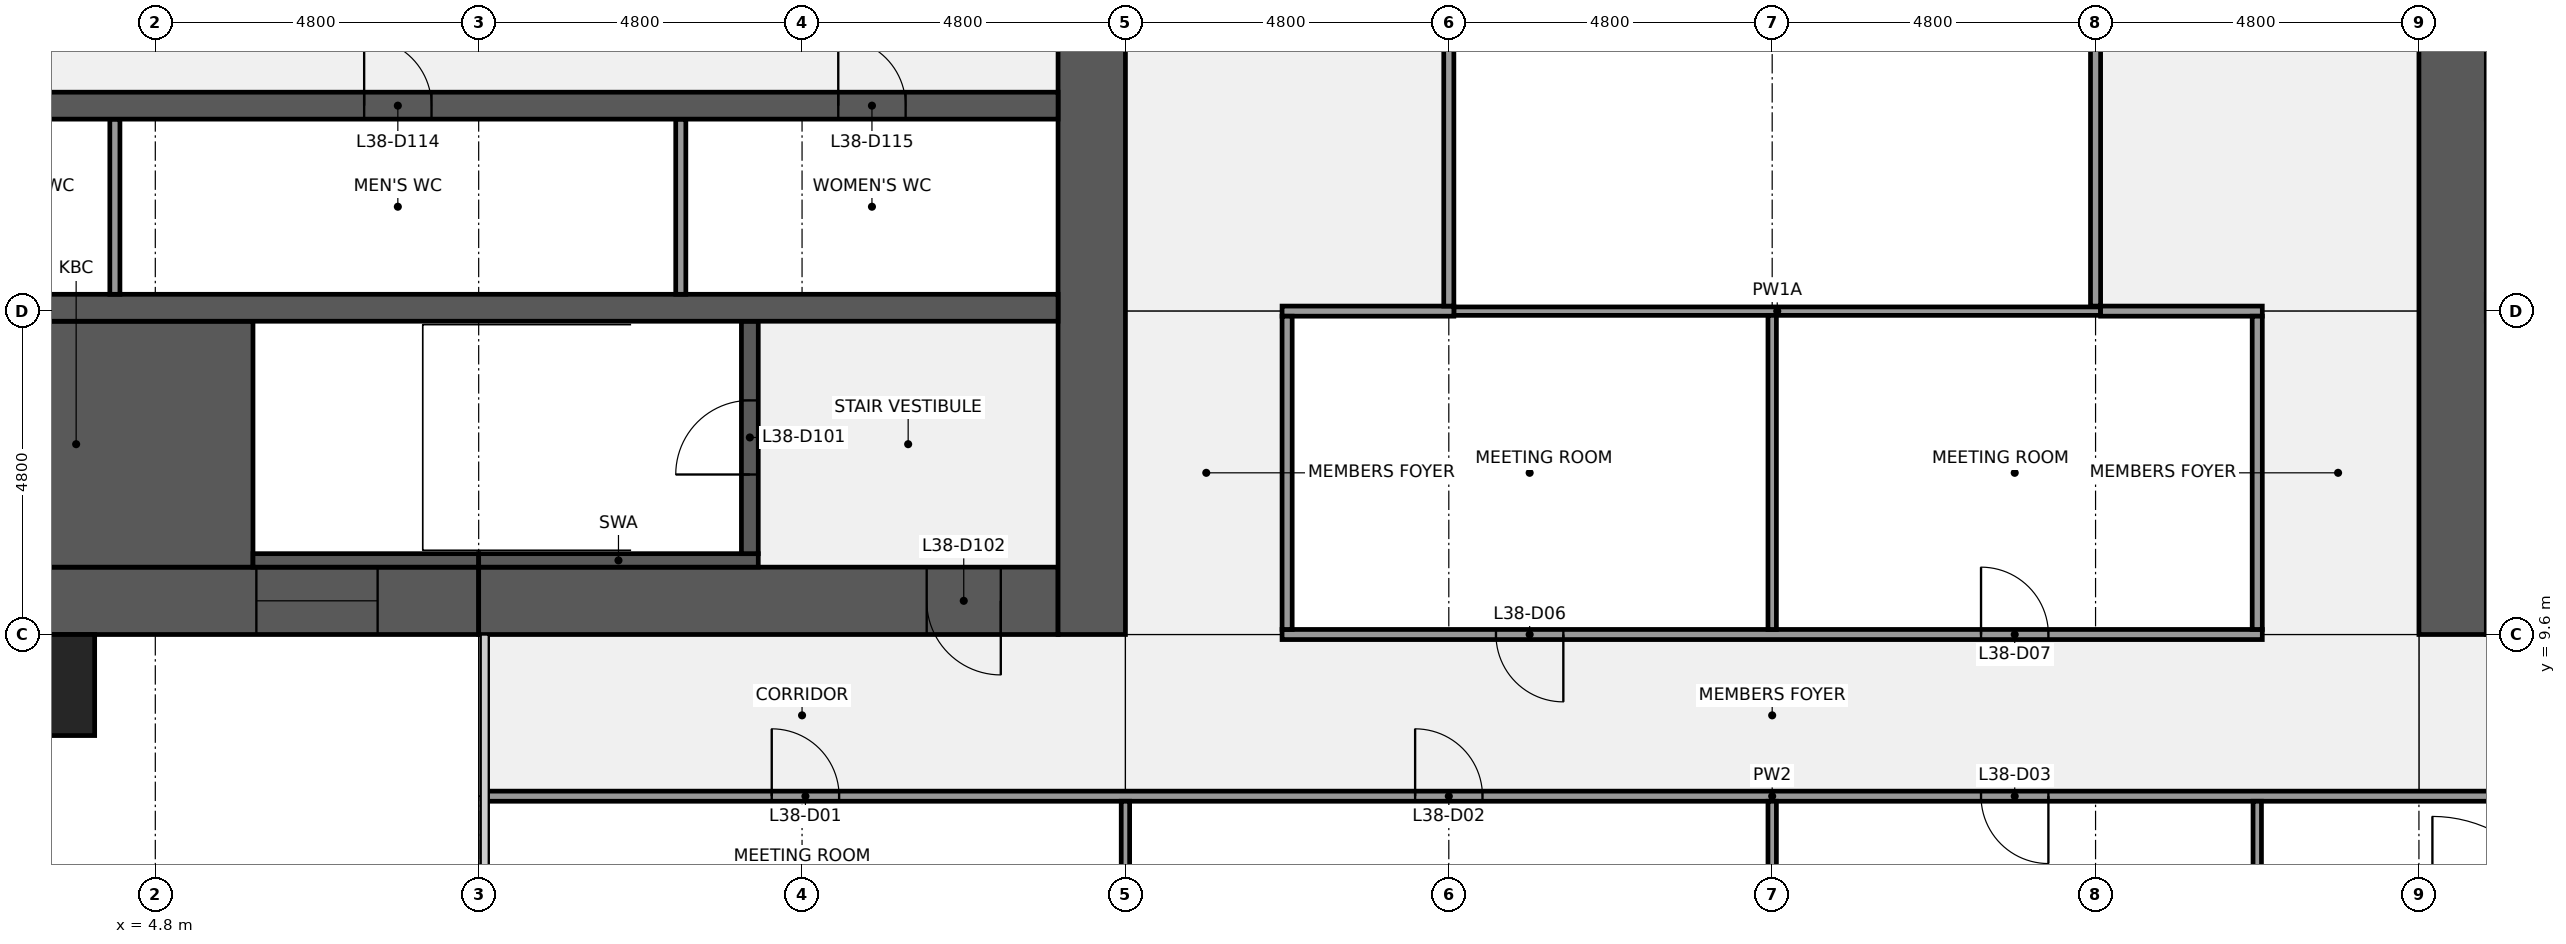
"""IFC4 building model, lengths in metres.
Left out: names, types, materials, properties, quantities, classifications, styles, units other than length and angle.
Written with IfcOpenShell. Run it as: python <this file> out.ifc"""

import sys

from ifc_helpers import new_model, si_unit, direction, frame, frame_2d, origin, origin_2d, place, context, subcontext, project, spatial, rectangle, extrude, element, fill, save


model = new_model("IFC4")
c1 = context("Model", 3, precision=1e-05, world=origin(), true_north=direction((0.0, 1.0)))
c2 = subcontext(c1, "Body", "Model", "MODEL_VIEW")
j1 = project(units=[si_unit("LENGTHUNIT", "METRE"), si_unit("PLANEANGLEUNIT", "RADIAN")], contexts=[c1])
p1 = place(None, origin())
s1 = spatial("IfcSite", under=j1, at=p1, CompositionType="ELEMENT")
p2 = place(p1, origin())
s2 = spatial("IfcBuilding", under=s1, at=p2, CompositionType="ELEMENT")
p3 = place(p2, frame((0.0, 0.0, 172.1)))
s3 = spatial("IfcBuildingStorey", under=s2, at=p3, CompositionType="ELEMENT", Elevation=172.1)
p4 = place(p3, frame((9.6, 10.1, 0.0), z_axis=(0.0, 0.0, 1.0), x_axis=(-1.0, 0.0, 0.0)))
e1 = element("IfcWall", 1, at=p4, inside=s3, PredefinedType="SHEAR", context=c2, shape_type="SweptSolid", body=[
    extrude(rectangle(XDim=8.6, YDim=1.0, at=frame_2d((4.3, 0.0))), origin(), (0.0, 0.0, 1.0), 3.7),
])
p5 = place(p4, frame((1.5, 0.0, 0.9)))
e2 = element("IfcOpeningElement", 2, at=p5, cuts=e1, PredefinedType="OPENING", context=c2, shape_type="SweptSolid", body=[
    extrude(rectangle(XDim=1.8, YDim=1.5, at=frame_2d((0.9, 0.75))), frame((0.0, 0.51, 0.0), z_axis=(0.0, -1.0, 0.0), x_axis=(1.0, 0.0, 0.0)), (0.0, 0.0, 1.0), 1.02),
])
p6 = place(p3, frame((18.2, 10.1, 0.0), z_axis=(0.0, 0.0, 1.0), x_axis=(-1.0, 0.0, 0.0)))
e3 = element("IfcWall", 3, at=p6, inside=s3, PredefinedType="SHEAR", context=c2, shape_type="SweptSolid", body=[
    extrude(rectangle(XDim=8.6, YDim=1.0, at=frame_2d((4.3, 0.0))), origin(), (0.0, 0.0, 1.0), 3.7),
])
p7 = place(p6, frame((0.85, 0.0, 0.0)))
e4 = element("IfcOpeningElement", 4, at=p7, cuts=e3, PredefinedType="OPENING", context=c2, shape_type="SweptSolid", body=[
    extrude(rectangle(XDim=1.1, YDim=2.1, at=frame_2d((0.55, 1.05))), frame((0.0, 0.51, 0.0), z_axis=(0.0, -1.0, 0.0), x_axis=(1.0, 0.0, 0.0)), (0.0, 0.0, 1.0), 1.02),
])
p8 = place(p3, frame((18.7, 38.4, 0.0), z_axis=(0.0, 0.0, 1.0), x_axis=(0.0, -1.0, 0.0)))
e5 = element("IfcWall", 5, at=p8, inside=s3, PredefinedType="SHEAR", context=c2, shape_type="SweptSolid", body=[
    extrude(rectangle(XDim=28.8, YDim=1.0, at=frame_2d((14.4, 0.0))), origin(), (0.0, 0.0, 1.0), 3.7),
])
p9 = place(p8, frame((18.3, 0.0, 0.0)))
e6 = element("IfcOpeningElement", 6, at=p9, cuts=e5, PredefinedType="OPENING", context=c2, shape_type="SweptSolid", body=[
    extrude(rectangle(XDim=1.8, YDim=2.1, at=frame_2d((0.9, 1.05))), frame((0.0, 0.51, 0.0), z_axis=(0.0, -1.0, 0.0), x_axis=(1.0, 0.0, 0.0)), (0.0, 0.0, 1.0), 1.02),
])
p10 = place(p8, frame((8.7, 0.0, 0.0)))
e7 = element("IfcOpeningElement", 7, at=p10, cuts=e5, PredefinedType="OPENING", context=c2, shape_type="SweptSolid", body=[
    extrude(rectangle(XDim=1.8, YDim=2.1, at=frame_2d((0.9, 1.05))), frame((0.0, 0.51, 0.0), z_axis=(0.0, -1.0, 0.0), x_axis=(1.0, 0.0, 0.0)), (0.0, 0.0, 1.0), 1.02),
])
p11 = place(p3, frame((1.0, 12.425, 0.0), z_axis=(0.0, 0.0, 1.0), x_axis=(1.0, 0.0, 0.0)))
e8 = element("IfcWall", 8, at=p11, inside=s3, PredefinedType="SHEAR", context=c2, shape_type="SweptSolid", body=[
    extrude(rectangle(XDim=5.25, YDim=3.65, at=frame_2d((2.625, 0.0))), origin(), (0.0, 0.0, 1.0), 3.7),
])
p12 = place(p3, frame((6.25, 10.7, 0.0), z_axis=(0.0, 0.0, 1.0), x_axis=(1.0, 0.0, 0.0)))
e9 = element("IfcWall", 9, at=p12, inside=s3, PredefinedType="SHEAR", context=c2, shape_type="SweptSolid", body=[
    extrude(rectangle(XDim=3.35, YDim=0.2, at=frame_2d((1.675, 0.0))), origin(), (0.0, 0.0, 1.0), 3.7),
])
p13 = place(p3, frame((9.6, 10.7, 0.0), z_axis=(0.0, 0.0, 1.0), x_axis=(1.0, 0.0, 0.0)))
e10 = element("IfcWall", 10, at=p13, inside=s3, PredefinedType="SHEAR", context=c2, shape_type="SweptSolid", body=[
    extrude(rectangle(XDim=4.15, YDim=0.2, at=frame_2d((2.075, 0.0))), origin(), (0.0, 0.0, 1.0), 3.7),
])
p14 = place(p3, frame((13.625, 10.8, 0.0), z_axis=(0.0, 0.0, 1.0), x_axis=(0.0, 1.0, 0.0)))
e11 = element("IfcWall", 11, at=p14, inside=s3, PredefinedType="SHEAR", context=c2, shape_type="SweptSolid", body=[
    extrude(rectangle(XDim=3.45, YDim=0.25, at=frame_2d((1.725, 0.0))), origin(), (0.0, 0.0, 1.0), 3.7),
])
p15 = place(p14, frame((1.175, 0.0, 0.0)))
e12 = element("IfcOpeningElement", 12, at=p15, cuts=e11, PredefinedType="OPENING", context=c2, shape_type="SweptSolid", body=[
    extrude(rectangle(XDim=1.1, YDim=2.1, at=frame_2d((0.55, 1.05))), frame((0.0, 0.135, 0.0), z_axis=(0.0, -1.0, 0.0), x_axis=(1.0, 0.0, 0.0)), (0.0, 0.0, 1.0), 0.27),
])
p16 = place(p3, frame((1.0, 14.45, 0.0), z_axis=(0.0, 0.0, 1.0), x_axis=(1.0, 0.0, 0.0)))
e13 = element("IfcWall", 13, at=p16, inside=s3, PredefinedType="SHEAR", context=c2, shape_type="SweptSolid", body=[
    extrude(rectangle(XDim=17.2, YDim=0.4, at=frame_2d((8.6, 0.0))), origin(), (0.0, 0.0, 1.0), 3.7),
])
for number, where, z_axis, x_axis in (
    (14, (4.2, 14.65, 0.0), (0.0, 0.0, 1.0), (0.0, 1.0, 0.0)),
    (15, (12.6, 14.65, 0.0), (0.0, 0.0, 1.0), (0.0, 1.0, 0.0)),
):
    element("IfcWall", number, at=place(p3, frame(where, z_axis=z_axis, x_axis=x_axis)), inside=s3, PredefinedType="PARTITIONING", context=c2, shape_type="SweptSolid", body=[
        extrude(rectangle(XDim=2.6, YDim=0.15, at=frame_2d((1.3, 0.0))), origin(), (0.0, 0.0, 1.0), 3.7),
    ])
p17 = place(p3, frame((1.0, 17.45, 0.0), z_axis=(0.0, 0.0, 1.0), x_axis=(1.0, 0.0, 0.0)))
e16 = element("IfcWall", 16, at=p17, inside=s3, PredefinedType="SHEAR", context=c2, shape_type="SweptSolid", body=[
    extrude(rectangle(XDim=17.2, YDim=0.4, at=frame_2d((8.6, 0.0))), origin(), (0.0, 0.0, 1.0), 3.7),
])
p18 = place(p17, frame((1.062, 0.0, 0.0)))
e17 = element("IfcOpeningElement", 17, at=p18, cuts=e16, PredefinedType="OPENING", context=c2, shape_type="SweptSolid", body=[
    extrude(rectangle(XDim=1.0, YDim=2.1, at=frame_2d((0.5, 1.05))), frame((0.0, 0.21, 0.0), z_axis=(0.0, -1.0, 0.0), x_axis=(1.0, 0.0, 0.0)), (0.0, 0.0, 1.0), 0.42),
])
p19 = place(p17, frame((6.9, 0.0, 0.0)))
e18 = element("IfcOpeningElement", 18, at=p19, cuts=e16, PredefinedType="OPENING", context=c2, shape_type="SweptSolid", body=[
    extrude(rectangle(XDim=1.0, YDim=2.1, at=frame_2d((0.5, 1.05))), frame((0.0, 0.21, 0.0), z_axis=(0.0, -1.0, 0.0), x_axis=(1.0, 0.0, 0.0)), (0.0, 0.0, 1.0), 0.42),
])
p20 = place(p17, frame((13.938, 0.0, 0.0)))
e19 = element("IfcOpeningElement", 19, at=p20, cuts=e16, PredefinedType="OPENING", context=c2, shape_type="SweptSolid", body=[
    extrude(rectangle(XDim=1.0, YDim=2.1, at=frame_2d((0.5, 1.05))), frame((0.0, 0.21, 0.0), z_axis=(0.0, -1.0, 0.0), x_axis=(1.0, 0.0, 0.0)), (0.0, 0.0, 1.0), 0.42),
])
p21 = place(p3, frame((38.9, 9.6, 0.0), z_axis=(0.0, 0.0, 1.0), x_axis=(0.0, 1.0, 0.0)))
e20 = element("IfcWall", 20, at=p21, inside=s3, PredefinedType="SHEAR", context=c2, shape_type="SweptSolid", body=[
    extrude(rectangle(XDim=28.8, YDim=1.0, at=frame_2d((14.4, 0.0))), origin(), (0.0, 0.0, 1.0), 3.7),
])
p22 = place(p21, frame((8.7, 0.0, 0.0)))
e21 = element("IfcOpeningElement", 21, at=p22, cuts=e20, PredefinedType="OPENING", context=c2, shape_type="SweptSolid", body=[
    extrude(rectangle(XDim=1.8, YDim=2.1, at=frame_2d((0.9, 1.05))), frame((0.0, 0.51, 0.0), z_axis=(0.0, -1.0, 0.0), x_axis=(1.0, 0.0, 0.0)), (0.0, 0.0, 1.0), 1.02),
])
p23 = place(p21, frame((18.3, 0.0, 0.0)))
e22 = element("IfcOpeningElement", 22, at=p23, cuts=e20, PredefinedType="OPENING", context=c2, shape_type="SweptSolid", body=[
    extrude(rectangle(XDim=1.8, YDim=2.1, at=frame_2d((0.9, 1.05))), frame((0.0, 0.51, 0.0), z_axis=(0.0, -1.0, 0.0), x_axis=(1.0, 0.0, 0.0)), (0.0, 0.0, 1.0), 1.02),
])
p24 = place(p3, frame((9.7, 7.2, 0.0), z_axis=(0.0, 0.0, 1.0), x_axis=(1.0, 0.0, 0.0)))
e23 = element("IfcWall", 23, at=p24, inside=s3, PredefinedType="PARTITIONING", context=c2, shape_type="SweptSolid", body=[
    extrude(rectangle(XDim=38.2, YDim=0.15, at=frame_2d((19.1, 0.0))), origin(), (0.0, 0.0, 1.0), 2.709),
])
p25 = place(p24, frame((4.25, 0.0, 0.0)))
e24 = element("IfcOpeningElement", 24, at=p25, cuts=e23, PredefinedType="OPENING", context=c2, shape_type="SweptSolid", body=[
    extrude(rectangle(XDim=1.0, YDim=2.1, at=frame_2d((0.5, 1.05))), frame((0.0, 0.085, 0.0), z_axis=(0.0, -1.0, 0.0), x_axis=(1.0, 0.0, 0.0)), (0.0, 0.0, 1.0), 0.17),
])
p26 = place(p24, frame((13.8, 0.0, 0.0)))
e25 = element("IfcOpeningElement", 25, at=p26, cuts=e23, PredefinedType="OPENING", context=c2, shape_type="SweptSolid", body=[
    extrude(rectangle(XDim=1.0, YDim=2.1, at=frame_2d((0.5, 1.05))), frame((0.0, 0.085, 0.0), z_axis=(0.0, -1.0, 0.0), x_axis=(1.0, 0.0, 0.0)), (0.0, 0.0, 1.0), 0.17),
])
p27 = place(p24, frame((22.2, 0.0, 0.0)))
e26 = element("IfcOpeningElement", 26, at=p27, cuts=e23, PredefinedType="OPENING", context=c2, shape_type="SweptSolid", body=[
    extrude(rectangle(XDim=1.0, YDim=2.1, at=frame_2d((0.5, 1.05))), frame((0.0, 0.085, 0.0), z_axis=(0.0, -1.0, 0.0), x_axis=(1.0, 0.0, 0.0)), (0.0, 0.0, 1.0), 0.17),
])
p28 = place(p24, frame((30.6, 0.0, 0.0)))
e27 = element("IfcOpeningElement", 27, at=p28, cuts=e23, PredefinedType="OPENING", context=c2, shape_type="SweptSolid", body=[
    extrude(rectangle(XDim=1.0, YDim=2.1, at=frame_2d((0.5, 1.05))), frame((0.0, 0.085, 0.0), z_axis=(0.0, -1.0, 0.0), x_axis=(1.0, 0.0, 0.0)), (0.0, 0.0, 1.0), 0.17),
])
p29 = place(p24, frame((35.35, 0.0, 0.0)))
e28 = element("IfcOpeningElement", 28, at=p29, cuts=e23, PredefinedType="OPENING", context=c2, shape_type="SweptSolid", body=[
    extrude(rectangle(XDim=1.0, YDim=2.1, at=frame_2d((0.5, 1.05))), frame((0.0, 0.085, 0.0), z_axis=(0.0, -1.0, 0.0), x_axis=(1.0, 0.0, 0.0)), (0.0, 0.0, 1.0), 0.17),
])
p30 = place(p3, frame((21.525, 9.6, 0.0), z_axis=(0.0, 0.0, 1.0), x_axis=(1.0, 0.0, 0.0)))
e29 = element("IfcWall", 29, at=p30, inside=s3, PredefinedType="PARTITIONING", context=c2, shape_type="SweptSolid", body=[
    extrude(rectangle(XDim=14.55, YDim=0.15, at=frame_2d((7.275, 0.0))), origin(), (0.0, 0.0, 1.0), 2.709),
])
p31 = place(p30, frame((3.175, 0.0, 0.0)))
e30 = element("IfcOpeningElement", 30, at=p31, cuts=e29, PredefinedType="OPENING", context=c2, shape_type="SweptSolid", body=[
    extrude(rectangle(XDim=1.0, YDim=2.1, at=frame_2d((0.5, 1.05))), frame((0.0, 0.085, 0.0), z_axis=(0.0, -1.0, 0.0), x_axis=(1.0, 0.0, 0.0)), (0.0, 0.0, 1.0), 0.17),
])
p32 = place(p30, frame((10.375, 0.0, 0.0)))
e31 = element("IfcOpeningElement", 31, at=p32, cuts=e29, PredefinedType="OPENING", context=c2, shape_type="SweptSolid", body=[
    extrude(rectangle(XDim=1.0, YDim=2.1, at=frame_2d((0.5, 1.05))), frame((0.0, 0.085, 0.0), z_axis=(0.0, -1.0, 0.0), x_axis=(1.0, 0.0, 0.0)), (0.0, 0.0, 1.0), 0.17),
])
p33 = place(p3, frame((24.075, 14.4, 0.0), z_axis=(0.0, 0.0, 1.0), x_axis=(1.0, 0.0, 0.0)))
e32 = element("IfcWall", 32, at=p33, inside=s3, PredefinedType="PARTITIONING", context=c2, shape_type="SweptSolid", body=[
    extrude(rectangle(XDim=9.6, YDim=0.125, at=frame_2d((4.8, 0.0))), origin(), (0.0, 0.0, 1.0), 2.709),
])
p34 = place(p3, frame((21.525, 14.4, 0.0), z_axis=(0.0, 0.0, 1.0), x_axis=(1.0, 0.0, 0.0)))
e33 = element("IfcWall", 33, at=p34, inside=s3, PredefinedType="PARTITIONING", context=c2, shape_type="SweptSolid", body=[
    extrude(rectangle(XDim=2.55, YDim=0.15, at=frame_2d((1.275, 0.0))), origin(), (0.0, 0.0, 1.0), 2.709),
])
p35 = place(p3, frame((33.675, 14.4, 0.0), z_axis=(0.0, 0.0, 1.0), x_axis=(1.0, 0.0, 0.0)))
e34 = element("IfcWall", 34, at=p35, inside=s3, PredefinedType="PARTITIONING", context=c2, shape_type="SweptSolid", body=[
    extrude(rectangle(XDim=2.4, YDim=0.15, at=frame_2d((1.2, 0.0))), origin(), (0.0, 0.0, 1.0), 2.709),
])
p36 = place(p3, frame((19.2, 4.9, 0.0), z_axis=(0.0, 0.0, 1.0), x_axis=(0.0, 1.0, 0.0)))
e35 = element("IfcWall", 35, at=p36, inside=s3, PredefinedType="PARTITIONING", context=c2, shape_type="SweptSolid", body=[
    extrude(rectangle(XDim=2.225, YDim=0.125, at=frame_2d((1.113, 0.0))), origin(), (0.0, 0.0, 1.0), 2.709),
])
p37 = place(p3, frame((21.6, 9.675, 0.0), z_axis=(0.0, 0.0, 1.0), x_axis=(0.0, 1.0, 0.0)))
e36 = element("IfcWall", 36, at=p37, inside=s3, PredefinedType="PARTITIONING", context=c2, shape_type="SweptSolid", body=[
    extrude(rectangle(XDim=4.65, YDim=0.15, at=frame_2d((2.325, 0.0))), origin(), (0.0, 0.0, 1.0), 2.709),
])
p38 = place(p3, frame((24.0, 14.475, 0.0), z_axis=(0.0, 0.0, 1.0), x_axis=(0.0, 1.0, 0.0)))
e37 = element("IfcWall", 37, at=p38, inside=s3, PredefinedType="PARTITIONING", context=c2, shape_type="SweptSolid", body=[
    extrude(rectangle(XDim=13.05, YDim=0.15, at=frame_2d((6.525, 0.0))), origin(), (0.0, 0.0, 1.0), 2.709),
])
p39 = place(p38, frame((6.025, 0.0, 0.0)))
e38 = element("IfcOpeningElement", 38, at=p39, cuts=e37, PredefinedType="OPENING", context=c2, shape_type="SweptSolid", body=[
    extrude(rectangle(XDim=1.0, YDim=2.1, at=frame_2d((0.5, 1.05))), frame((0.0, 0.085, 0.0), z_axis=(0.0, -1.0, 0.0), x_axis=(1.0, 0.0, 0.0)), (0.0, 0.0, 1.0), 0.17),
])
p40 = place(p3, frame((28.8, 0.6, 0.0), z_axis=(0.0, 0.0, 1.0), x_axis=(0.0, 1.0, 0.0)))
e39 = element("IfcWall", 39, at=p40, inside=s3, PredefinedType="PARTITIONING", context=c2, shape_type="SweptSolid", body=[
    extrude(rectangle(XDim=6.525, YDim=0.125, at=frame_2d((3.262, 0.0))), origin(), (0.0, 0.0, 1.0), 2.709),
])
p41 = place(p3, frame((28.8, 9.675, 0.0), z_axis=(0.0, 0.0, 1.0), x_axis=(0.0, 1.0, 0.0)))
e40 = element("IfcWall", 40, at=p41, inside=s3, PredefinedType="PARTITIONING", context=c2, shape_type="SweptSolid", body=[
    extrude(rectangle(XDim=4.662, YDim=0.125, at=frame_2d((2.331, 0.0))), origin(), (0.0, 0.0, 1.0), 2.709),
])
p42 = place(p3, frame((33.6, 14.475, 0.0), z_axis=(0.0, 0.0, 1.0), x_axis=(0.0, 1.0, 0.0)))
e41 = element("IfcWall", 41, at=p42, inside=s3, PredefinedType="PARTITIONING", context=c2, shape_type="SweptSolid", body=[
    extrude(rectangle(XDim=13.05, YDim=0.15, at=frame_2d((6.525, 0.0))), origin(), (0.0, 0.0, 1.0), 2.709),
])
p43 = place(p3, frame((36.0, 4.863, 0.0), z_axis=(0.0, 0.0, 1.0), x_axis=(0.0, 1.0, 0.0)))
e42 = element("IfcWall", 42, at=p43, inside=s3, PredefinedType="PARTITIONING", context=c2, shape_type="SweptSolid", body=[
    extrude(rectangle(XDim=2.262, YDim=0.125, at=frame_2d((1.131, 0.0))), origin(), (0.0, 0.0, 1.0), 2.709),
])
p44 = place(p3, frame((36.0, 9.675, 0.0), z_axis=(0.0, 0.0, 1.0), x_axis=(0.0, 1.0, 0.0)))
e43 = element("IfcWall", 43, at=p44, inside=s3, PredefinedType="PARTITIONING", context=c2, shape_type="SweptSolid", body=[
    extrude(rectangle(XDim=4.65, YDim=0.15, at=frame_2d((2.325, 0.0))), origin(), (0.0, 0.0, 1.0), 2.709),
])
p45 = place(p3, frame((2.4, 8.85, 0.0), z_axis=(0.0, 0.0, 1.0), x_axis=(1.0, 0.0, 0.0)))
e44 = element("IfcColumn", 44, at=p45, inside=s3, PredefinedType="PILASTER", context=c2, shape_type="SweptSolid", body=[
    extrude(rectangle(XDim=3.0, YDim=1.5, at=origin_2d()), origin(), (0.0, 0.0, 1.0), 4.0),
])
p46 = place(p15, origin())
e45 = element("IfcDoor", 45, at=p46, inside=s3, OperationType="SINGLE_SWING_LEFT", PredefinedType="DOOR", context=c2, shape_type="SweptSolid", body=[
    extrude(rectangle(XDim=1.1, YDim=2.1, at=frame_2d((0.55, 1.05))), frame((0.0, 0.025, 0.0), z_axis=(0.0, -1.0, 0.0), x_axis=(1.0, 0.0, 0.0)), (0.0, 0.0, 1.0), 0.05),
])
fill(e12, e45)
p47 = place(p7, origin())
e46 = element("IfcDoor", 46, at=p47, inside=s3, OperationType="SINGLE_SWING_LEFT", PredefinedType="DOOR", context=c2, shape_type="SweptSolid", body=[
    extrude(rectangle(XDim=1.1, YDim=2.1, at=frame_2d((0.55, 1.05))), frame((0.0, 0.025, 0.0), z_axis=(0.0, -1.0, 0.0), x_axis=(1.0, 0.0, 0.0)), (0.0, 0.0, 1.0), 0.05),
])
fill(e4, e46)
p48 = place(p19, origin())
e47 = element("IfcDoor", 47, at=p48, inside=s3, OperationType="SINGLE_SWING_LEFT", PredefinedType="DOOR", context=c2, shape_type="SweptSolid", body=[
    extrude(rectangle(XDim=1.0, YDim=2.1, at=frame_2d((0.5, 1.05))), frame((0.0, 0.025, 0.0), z_axis=(0.0, -1.0, 0.0), x_axis=(1.0, 0.0, 0.0)), (0.0, 0.0, 1.0), 0.05),
])
fill(e18, e47)
p49 = place(p20, origin())
e48 = element("IfcDoor", 48, at=p49, inside=s3, OperationType="SINGLE_SWING_LEFT", PredefinedType="DOOR", context=c2, shape_type="SweptSolid", body=[
    extrude(rectangle(XDim=1.0, YDim=2.1, at=frame_2d((0.5, 1.05))), frame((0.0, 0.025, 0.0), z_axis=(0.0, -1.0, 0.0), x_axis=(1.0, 0.0, 0.0)), (0.0, 0.0, 1.0), 0.05),
])
fill(e19, e48)
p50 = place(p5, origin())
e49 = element("IfcWindow", 49, at=p50, inside=s3, PartitioningType="SINGLE_PANEL", PredefinedType="WINDOW", context=c2, shape_type="SweptSolid", body=[
    extrude(rectangle(XDim=1.8, YDim=1.5, at=frame_2d((0.9, 0.75))), frame((0.0, 0.03, 0.0), z_axis=(0.0, -1.0, 0.0), x_axis=(1.0, 0.0, 0.0)), (0.0, 0.0, 1.0), 0.06),
])
fill(e2, e49)
p51 = place(p25, origin())
e50 = element("IfcDoor", 50, at=p51, inside=s3, OperationType="SINGLE_SWING_LEFT", PredefinedType="DOOR", context=c2, shape_type="SweptSolid", body=[
    extrude(rectangle(XDim=1.0, YDim=2.1, at=frame_2d((0.5, 1.05))), frame((0.0, 0.025, 0.0), z_axis=(0.0, -1.0, 0.0), x_axis=(1.0, 0.0, 0.0)), (0.0, 0.0, 1.0), 0.05),
])
fill(e24, e50)
p52 = place(p26, origin())
e51 = element("IfcDoor", 51, at=p52, inside=s3, OperationType="SINGLE_SWING_LEFT", PredefinedType="DOOR", context=c2, shape_type="SweptSolid", body=[
    extrude(rectangle(XDim=1.0, YDim=2.1, at=frame_2d((0.5, 1.05))), frame((0.0, 0.025, 0.0), z_axis=(0.0, -1.0, 0.0), x_axis=(1.0, 0.0, 0.0)), (0.0, 0.0, 1.0), 0.05),
])
fill(e25, e51)
p53 = place(p27, origin())
e52 = element("IfcDoor", 52, at=p53, inside=s3, OperationType="SINGLE_SWING_RIGHT", PredefinedType="DOOR", context=c2, shape_type="SweptSolid", body=[
    extrude(rectangle(XDim=1.0, YDim=2.1, at=frame_2d((0.5, 1.05))), frame((0.0, 0.025, 0.0), z_axis=(0.0, -1.0, 0.0), x_axis=(1.0, 0.0, 0.0)), (0.0, 0.0, 1.0), 0.05),
])
fill(e26, e52)
p54 = place(p31, origin())
e53 = element("IfcDoor", 53, at=p54, inside=s3, OperationType="SINGLE_SWING_RIGHT", PredefinedType="DOOR", context=c2, shape_type="SweptSolid", body=[
    extrude(rectangle(XDim=1.0, YDim=2.1, at=frame_2d((0.5, 1.05))), frame((0.0, 0.025, 0.0), z_axis=(0.0, -1.0, 0.0), x_axis=(1.0, 0.0, 0.0)), (0.0, 0.0, 1.0), 0.05),
])
fill(e30, e53)
p55 = place(p32, origin())
e54 = element("IfcDoor", 54, at=p55, inside=s3, OperationType="SINGLE_SWING_LEFT", PredefinedType="DOOR", context=c2, shape_type="SweptSolid", body=[
    extrude(rectangle(XDim=1.0, YDim=2.1, at=frame_2d((0.5, 1.05))), frame((0.0, 0.025, 0.0), z_axis=(0.0, -1.0, 0.0), x_axis=(1.0, 0.0, 0.0)), (0.0, 0.0, 1.0), 0.05),
])
fill(e31, e54)
save(model, sys.argv[1])
